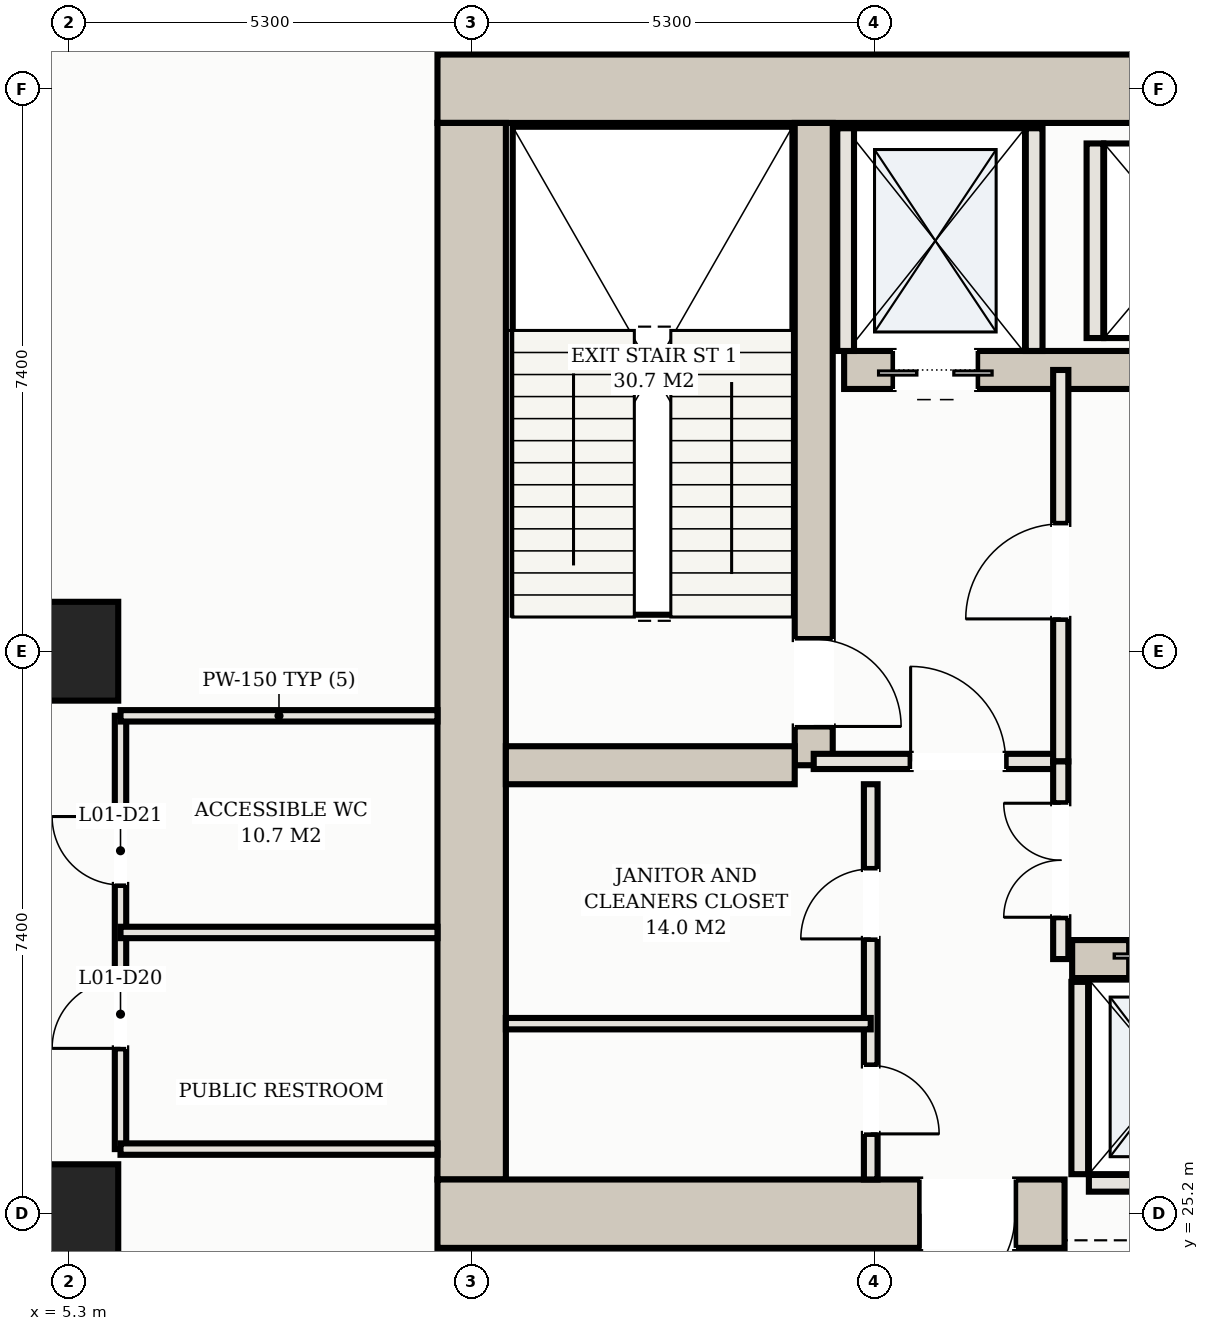
"""IFC4 building model, lengths in metres.
Left out: names, types, materials, properties, quantities, classifications, styles, units other than length and angle.
Written with IfcOpenShell. Run it as: python <this file> out.ifc"""

import sys

from ifc_helpers import new_model, si_unit, direction, frame, frame_2d, origin, origin_2d, place, context, subcontext, project, spatial, rectangle, hollow_rectangle, extrude, element, fill, save


model = new_model("IFC4")
c1 = context("Model", 3, precision=1e-05, world=origin(), true_north=direction((0.0, 1.0)))
c2 = subcontext(c1, "Body", "Model", "MODEL_VIEW")
j1 = project(units=[si_unit("LENGTHUNIT", "METRE"), si_unit("PLANEANGLEUNIT", "RADIAN")], contexts=[c1])
p1 = place(None, origin())
s1 = spatial("IfcSite", under=j1, at=p1, CompositionType="ELEMENT")
p2 = place(p1, origin())
s2 = spatial("IfcBuilding", under=s1, at=p2, CompositionType="ELEMENT")
p3 = place(p2, frame((0.0, 0.0, 5.2)))
s3 = spatial("IfcBuildingStorey", under=s2, at=p3, CompositionType="ELEMENT", Elevation=5.2)
p4 = place(p3, frame((10.15, 40.0, 0.0), z_axis=(0.0, 0.0, 1.0), x_axis=(1.0, 0.0, 0.0)))
e1 = element("IfcWall", 1, at=p4, inside=s3, PredefinedType="SHEAR", context=c2, shape_type="SweptSolid", body=[
    extrude(rectangle(XDim=32.7, YDim=0.9, at=frame_2d((16.35, 0.0))), origin(), (0.0, 0.0, 1.0), 4.35),
])
p5 = place(p3, frame((10.6, 25.65, 0.0), z_axis=(0.0, 0.0, 1.0), x_axis=(0.0, 1.0, 0.0)))
e2 = element("IfcWall", 2, at=p5, inside=s3, PredefinedType="SHEAR", context=c2, shape_type="SweptSolid", body=[
    extrude(rectangle(XDim=13.9, YDim=0.9, at=frame_2d((6.95, 0.0))), origin(), (0.0, 0.0, 1.0), 4.35),
])
p6 = place(p3, frame((10.15, 25.2, 0.0), z_axis=(0.0, 0.0, 1.0), x_axis=(1.0, 0.0, 0.0)))
e3 = element("IfcWall", 3, at=p6, inside=s3, PredefinedType="SHEAR", context=c2, shape_type="SweptSolid", body=[
    extrude(rectangle(XDim=8.25, YDim=0.9, at=frame_2d((4.125, 0.0))), origin(), (0.0, 0.0, 1.0), 4.35),
])
p7 = place(p6, frame((6.35, 0.0, 0.0)))
e4 = element("IfcOpeningElement", 4, at=p7, cuts=e3, PredefinedType="OPENING", context=c2, shape_type="SweptSolid", body=[
    extrude(rectangle(XDim=1.25, YDim=2.2, at=frame_2d((0.625, 1.1))), frame((0.0, 0.46, 0.0), z_axis=(0.0, -1.0, 0.0), x_axis=(1.0, 0.0, 0.0)), (0.0, 0.0, 1.0), 0.92),
])
p8 = place(p3, frame((15.1, 31.1, 0.0), z_axis=(0.0, 0.0, 1.0), x_axis=(0.0, 1.0, 0.0)))
e5 = element("IfcWall", 5, at=p8, inside=s3, PredefinedType="SHEAR", context=c2, shape_type="SweptSolid", body=[
    extrude(rectangle(XDim=8.45, YDim=0.5, at=frame_2d((4.225, 0.0))), origin(), (0.0, 0.0, 1.0), 4.35),
])
p9 = place(p8, frame((0.51, 0.0, 0.0)))
e6 = element("IfcOpeningElement", 6, at=p9, cuts=e5, PredefinedType="OPENING", context=c2, shape_type="SweptSolid", body=[
    extrude(rectangle(XDim=1.15, YDim=2.2, at=frame_2d((0.575, 1.1))), frame((0.0, 0.26, 0.0), z_axis=(0.0, -1.0, 0.0), x_axis=(1.0, 0.0, 0.0)), (0.0, 0.0, 1.0), 0.52),
])
p10 = place(p3, frame((11.05, 31.1, 0.0), z_axis=(0.0, 0.0, 1.0), x_axis=(1.0, 0.0, 0.0)))
e7 = element("IfcWall", 7, at=p10, inside=s3, PredefinedType="SHEAR", context=c2, shape_type="SweptSolid", body=[
    extrude(rectangle(XDim=3.8, YDim=0.5, at=frame_2d((1.9, 0.0))), origin(), (0.0, 0.0, 1.0), 4.35),
])
p11 = place(p3, frame((15.5, 36.3, 0.0), z_axis=(0.0, 0.0, 1.0), x_axis=(1.0, 0.0, 0.0)))
e8 = element("IfcWall", 8, at=p11, inside=s3, PredefinedType="SHEAR", context=c2, shape_type="SweptSolid", body=[
    extrude(rectangle(XDim=22.0, YDim=0.5, at=frame_2d((11.0, 0.0))), origin(), (0.0, 0.0, 1.0), 4.35),
])
p12 = place(p11, frame((0.65, 0.0, 0.0)))
e9 = element("IfcOpeningElement", 9, at=p12, cuts=e8, PredefinedType="OPENING", context=c2, shape_type="SweptSolid", body=[
    extrude(rectangle(XDim=1.1, YDim=2.15, at=frame_2d((0.55, 1.075))), frame((0.0, 0.26, 0.0), z_axis=(0.0, -1.0, 0.0), x_axis=(1.0, 0.0, 0.0)), (0.0, 0.0, 1.0), 0.52),
])
p13 = place(p11, frame((20.25, 0.0, 0.0)))
e10 = element("IfcOpeningElement", 10, at=p13, cuts=e8, PredefinedType="OPENING", context=c2, shape_type="SweptSolid", body=[
    extrude(rectangle(XDim=1.1, YDim=2.15, at=frame_2d((0.55, 1.075))), frame((0.0, 0.26, 0.0), z_axis=(0.0, -1.0, 0.0), x_axis=(1.0, 0.0, 0.0)), (0.0, 0.0, 1.0), 0.52),
])
p14 = place(p11, frame((17.05, 0.0, 0.0)))
e11 = element("IfcOpeningElement", 11, at=p14, cuts=e8, PredefinedType="OPENING", context=c2, shape_type="SweptSolid", body=[
    extrude(rectangle(XDim=1.3, YDim=2.2, at=frame_2d((0.65, 1.1))), frame((0.0, 0.26, 0.0), z_axis=(0.0, -1.0, 0.0), x_axis=(1.0, 0.0, 0.0)), (0.0, 0.0, 1.0), 0.52),
])
p15 = place(p3, frame((18.5, 28.55, 0.0), z_axis=(0.0, 0.0, 1.0), x_axis=(1.0, 0.0, 0.0)))
e12 = element("IfcWall", 12, at=p15, inside=s3, PredefinedType="SHEAR", context=c2, shape_type="SweptSolid", body=[
    extrude(rectangle(XDim=16.0, YDim=0.5, at=frame_2d((8.0, 0.0))), origin(), (0.0, 0.0, 1.0), 4.35),
])
p16 = place(p15, frame((0.75, 0.0, 0.0)))
e13 = element("IfcOpeningElement", 13, at=p16, cuts=e12, PredefinedType="OPENING", context=c2, shape_type="SweptSolid", body=[
    extrude(rectangle(XDim=1.1, YDim=2.15, at=frame_2d((0.55, 1.075))), frame((0.0, 0.26, 0.0), z_axis=(0.0, -1.0, 0.0), x_axis=(1.0, 0.0, 0.0)), (0.0, 0.0, 1.0), 0.52),
])
p17 = place(p15, frame((3.35, 0.0, 0.0)))
e14 = element("IfcOpeningElement", 14, at=p17, cuts=e12, PredefinedType="OPENING", context=c2, shape_type="SweptSolid", body=[
    extrude(rectangle(XDim=1.1, YDim=2.15, at=frame_2d((0.55, 1.075))), frame((0.0, 0.26, 0.0), z_axis=(0.0, -1.0, 0.0), x_axis=(1.0, 0.0, 0.0)), (0.0, 0.0, 1.0), 0.52),
])
p18 = place(p15, frame((5.95, 0.0, 0.0)))
e15 = element("IfcOpeningElement", 15, at=p18, cuts=e12, PredefinedType="OPENING", context=c2, shape_type="SweptSolid", body=[
    extrude(rectangle(XDim=1.1, YDim=2.15, at=frame_2d((0.55, 1.075))), frame((0.0, 0.26, 0.0), z_axis=(0.0, -1.0, 0.0), x_axis=(1.0, 0.0, 0.0)), (0.0, 0.0, 1.0), 0.52),
])
for number, where, z_axis, x_axis in (
    (16, (5.3, 25.2, 0.0), (0.0, 0.0, 1.0), (1.0, 0.0, 0.0)),
    (17, (5.3, 32.6, 0.0), (0.0, 0.0, 1.0), (1.0, 0.0, 0.0)),
):
    element("IfcColumn", number, at=place(p3, frame(where, z_axis=z_axis, x_axis=x_axis)), inside=s3, PredefinedType="COLUMN", context=c2, shape_type="SweptSolid", body=[
        extrude(hollow_rectangle(XDim=1.3, YDim=1.3, WallThickness=0.042, at=origin_2d()), origin(), (0.0, 0.0, 1.0), 4.6),
    ])
for number, where, z_axis, x_axis in (
    (18, (15.52, 36.55, 0.0), (0.0, 0.0, 1.0), (0.0, 1.0, 0.0)),
    (19, (18.0, 36.55, 0.0), (0.0, 0.0, 1.0), (0.0, 1.0, 0.0)),
):
    element("IfcWall", number, at=place(p3, frame(where, z_axis=z_axis, x_axis=x_axis)), inside=s3, PredefinedType="SOLIDWALL", context=c2, shape_type="SweptSolid", body=[
        extrude(rectangle(XDim=2.93, YDim=0.22, at=frame_2d((1.465, 0.0))), origin(), (0.0, 0.0, 1.0), 4.35),
    ])
p19 = place(p3, frame((18.6, 25.72, 0.0), z_axis=(0.0, 0.0, 1.0), x_axis=(0.0, 1.0, 0.0)))
e20 = element("IfcWall", 20, at=p19, inside=s3, PredefinedType="SOLIDWALL", context=c2, shape_type="SweptSolid", body=[
    extrude(rectangle(XDim=2.53, YDim=0.22, at=frame_2d((1.265, 0.0))), origin(), (0.0, 0.0, 1.0), 4.35),
])
p20 = place(p3, frame((18.72, 25.6, 0.0), z_axis=(0.0, 0.0, 1.0), x_axis=(1.0, 0.0, 0.0)))
e21 = element("IfcWall", 21, at=p20, inside=s3, PredefinedType="SOLIDWALL", context=c2, shape_type="SweptSolid", body=[
    extrude(rectangle(XDim=2.16, YDim=0.22, at=frame_2d((1.08, 0.0))), origin(), (0.0, 0.0, 1.0), 4.35),
])
p21 = place(p3, frame((18.8, 36.72, 0.0), z_axis=(0.0, 0.0, 1.0), x_axis=(0.0, 1.0, 0.0)))
e22 = element("IfcWall", 22, at=p21, inside=s3, PredefinedType="SOLIDWALL", context=c2, shape_type="SweptSolid", body=[
    extrude(rectangle(XDim=2.56, YDim=0.22, at=frame_2d((1.28, 0.0))), origin(), (0.0, 0.0, 1.0), 4.35),
])
p22 = place(p3, frame((15.1, 31.15, 0.0), z_axis=(0.0, 0.0, 1.0), x_axis=(1.0, 0.0, 0.0)))
e23 = element("IfcWall", 23, at=p22, inside=s3, PredefinedType="PARTITIONING", context=c2, shape_type="SweptSolid", body=[
    extrude(rectangle(XDim=3.25, YDim=0.2, at=frame_2d((1.625, 0.0))), origin(), (0.0, 0.0, 1.0), 4.35),
])
p23 = place(p22, frame((1.275, 0.0, 0.0)))
e24 = element("IfcOpeningElement", 24, at=p23, cuts=e23, PredefinedType="OPENING", context=c2, shape_type="SweptSolid", body=[
    extrude(rectangle(XDim=1.25, YDim=2.2, at=frame_2d((0.625, 1.1))), frame((0.0, 0.11, 0.0), z_axis=(0.0, -1.0, 0.0), x_axis=(1.0, 0.0, 0.0)), (0.0, 0.0, 1.0), 0.22),
])
p24 = place(p3, frame((18.35, 31.15, 0.0), z_axis=(0.0, 0.0, 1.0), x_axis=(0.0, 1.0, 0.0)))
e25 = element("IfcWall", 25, at=p24, inside=s3, PredefinedType="PARTITIONING", context=c2, shape_type="SweptSolid", body=[
    extrude(rectangle(XDim=5.15, YDim=0.2, at=frame_2d((2.575, 0.0))), origin(), (0.0, 0.0, 1.0), 4.35),
])
p25 = place(p24, frame((1.875, 0.0, 0.0)))
e26 = element("IfcOpeningElement", 26, at=p25, cuts=e25, PredefinedType="OPENING", context=c2, shape_type="SweptSolid", body=[
    extrude(rectangle(XDim=1.25, YDim=2.2, at=frame_2d((0.625, 1.1))), frame((0.0, 0.11, 0.0), z_axis=(0.0, -1.0, 0.0), x_axis=(1.0, 0.0, 0.0)), (0.0, 0.0, 1.0), 0.22),
])
p26 = place(p3, frame((15.85, 25.65, 0.0), z_axis=(0.0, 0.0, 1.0), x_axis=(0.0, 1.0, 0.0)))
e27 = element("IfcWall", 27, at=p26, inside=s3, PredefinedType="PARTITIONING", context=c2, shape_type="SweptSolid", body=[
    extrude(rectangle(XDim=5.2, YDim=0.18, at=frame_2d((2.6, 0.0))), origin(), (0.0, 0.0, 1.0), 4.35),
])
p27 = place(p26, frame((0.6, 0.0, 0.0)))
e28 = element("IfcOpeningElement", 28, at=p27, cuts=e27, PredefinedType="OPENING", context=c2, shape_type="SweptSolid", body=[
    extrude(rectangle(XDim=0.9, YDim=2.15, at=frame_2d((0.45, 1.075))), frame((0.0, 0.1, 0.0), z_axis=(0.0, -1.0, 0.0), x_axis=(1.0, 0.0, 0.0)), (0.0, 0.0, 1.0), 0.2),
])
p28 = place(p26, frame((3.165, 0.0, 0.0)))
e29 = element("IfcOpeningElement", 29, at=p28, cuts=e27, PredefinedType="OPENING", context=c2, shape_type="SweptSolid", body=[
    extrude(rectangle(XDim=0.92, YDim=2.15, at=frame_2d((0.46, 1.075))), frame((0.0, 0.1, 0.0), z_axis=(0.0, -1.0, 0.0), x_axis=(1.0, 0.0, 0.0)), (0.0, 0.0, 1.0), 0.2),
])
p29 = place(p3, frame((11.05, 27.7, 0.0), z_axis=(0.0, 0.0, 1.0), x_axis=(1.0, 0.0, 0.0)))
e30 = element("IfcWall", 30, at=p29, inside=s3, PredefinedType="PARTITIONING", context=c2, shape_type="SweptSolid", body=[
    extrude(rectangle(XDim=4.8, YDim=0.15, at=frame_2d((2.4, 0.0))), origin(), (0.0, 0.0, 1.0), 4.35),
])
p30 = place(p3, frame((18.35, 28.55, 0.0), z_axis=(0.0, 0.0, 1.0), x_axis=(0.0, 1.0, 0.0)))
e31 = element("IfcWall", 31, at=p30, inside=s3, PredefinedType="PARTITIONING", context=c2, shape_type="SweptSolid", body=[
    extrude(rectangle(XDim=2.6, YDim=0.2, at=frame_2d((1.3, 0.0))), origin(), (0.0, 0.0, 1.0), 4.35),
])
p31 = place(p30, frame((0.55, 0.0, 0.0)))
e32 = element("IfcOpeningElement", 32, at=p31, cuts=e31, PredefinedType="OPENING", context=c2, shape_type="SweptSolid", body=[
    extrude(rectangle(XDim=1.5, YDim=2.25, at=frame_2d((0.75, 1.125))), frame((0.0, 0.11, 0.0), z_axis=(0.0, -1.0, 0.0), x_axis=(1.0, 0.0, 0.0)), (0.0, 0.0, 1.0), 0.22),
])
p32 = place(p3, frame((5.98, 26.05, 0.0), z_axis=(0.0, 0.0, 1.0), x_axis=(0.0, 1.0, 0.0)))
e33 = element("IfcWall", 33, at=p32, inside=s3, PredefinedType="PARTITIONING", context=c2, shape_type="SweptSolid", body=[
    extrude(rectangle(XDim=5.7, YDim=0.15, at=frame_2d((2.85, 0.0))), origin(), (0.0, 0.0, 1.0), 4.35),
])
p33 = place(p32, frame((1.325, 0.0, 0.0)))
e34 = element("IfcOpeningElement", 34, at=p33, cuts=e33, PredefinedType="OPENING", context=c2, shape_type="SweptSolid", body=[
    extrude(rectangle(XDim=0.9, YDim=2.15, at=frame_2d((0.45, 1.075))), frame((0.0, 0.085, 0.0), z_axis=(0.0, -1.0, 0.0), x_axis=(1.0, 0.0, 0.0)), (0.0, 0.0, 1.0), 0.17),
])
p34 = place(p32, frame((3.475, 0.0, 0.0)))
e35 = element("IfcOpeningElement", 35, at=p34, cuts=e33, PredefinedType="OPENING", context=c2, shape_type="SweptSolid", body=[
    extrude(rectangle(XDim=0.9, YDim=2.15, at=frame_2d((0.45, 1.075))), frame((0.0, 0.085, 0.0), z_axis=(0.0, -1.0, 0.0), x_axis=(1.0, 0.0, 0.0)), (0.0, 0.0, 1.0), 0.17),
])
for number, where, z_axis, x_axis in (
    (36, (5.98, 26.05, 0.0), (0.0, 0.0, 1.0), (1.0, 0.0, 0.0)),
    (37, (5.98, 28.9, 0.0), (0.0, 0.0, 1.0), (1.0, 0.0, 0.0)),
    (38, (5.98, 31.75, 0.0), (0.0, 0.0, 1.0), (1.0, 0.0, 0.0)),
):
    element("IfcWall", number, at=place(p3, frame(where, z_axis=z_axis, x_axis=x_axis)), inside=s3, PredefinedType="PARTITIONING", context=c2, shape_type="SweptSolid", body=[
        extrude(rectangle(XDim=4.17, YDim=0.15, at=frame_2d((2.085, 0.0))), origin(), (0.0, 0.0, 1.0), 4.35),
    ])
p35 = place(p12, frame((1.1, 0.0, 0.0), z_axis=(0.0, 0.0, 1.0), x_axis=(-1.0, 0.0, 0.0)))
e39 = element("IfcDoor", 39, at=p35, inside=s3, OperationType="DOUBLE_DOOR_SLIDING", PredefinedType="DOOR", context=c2, shape_type="SweptSolid", body=[
    extrude(rectangle(XDim=1.1, YDim=2.15, at=frame_2d((0.55, 1.075))), frame((0.0, 0.025, 0.0), z_axis=(0.0, -1.0, 0.0), x_axis=(1.0, 0.0, 0.0)), (0.0, 0.0, 1.0), 0.05),
])
fill(e9, e39)
p36 = place(p7, frame((1.25, 0.0, 0.0), z_axis=(0.0, 0.0, 1.0), x_axis=(-1.0, 0.0, 0.0)))
e40 = element("IfcDoor", 40, at=p36, inside=s3, OperationType="SINGLE_SWING_RIGHT", PredefinedType="DOOR", context=c2, shape_type="SweptSolid", body=[
    extrude(rectangle(XDim=1.25, YDim=2.2, at=frame_2d((0.625, 1.1))), frame((0.0, 0.025, 0.0), z_axis=(0.0, -1.0, 0.0), x_axis=(1.0, 0.0, 0.0)), (0.0, 0.0, 1.0), 0.05),
])
fill(e4, e40)
p37 = place(p23, origin())
e41 = element("IfcDoor", 41, at=p37, inside=s3, OperationType="SINGLE_SWING_LEFT", PredefinedType="DOOR", context=c2, shape_type="SweptSolid", body=[
    extrude(rectangle(XDim=1.25, YDim=2.2, at=frame_2d((0.625, 1.1))), frame((0.0, 0.025, 0.0), z_axis=(0.0, -1.0, 0.0), x_axis=(1.0, 0.0, 0.0)), (0.0, 0.0, 1.0), 0.05),
])
fill(e24, e41)
p38 = place(p25, origin())
e42 = element("IfcDoor", 42, at=p38, inside=s3, OperationType="SINGLE_SWING_LEFT", PredefinedType="DOOR", context=c2, shape_type="SweptSolid", body=[
    extrude(rectangle(XDim=1.25, YDim=2.2, at=frame_2d((0.625, 1.1))), frame((0.0, 0.025, 0.0), z_axis=(0.0, -1.0, 0.0), x_axis=(1.0, 0.0, 0.0)), (0.0, 0.0, 1.0), 0.05),
])
fill(e26, e42)
p39 = place(p9, frame((1.15, 0.0, 0.0), z_axis=(0.0, 0.0, 1.0), x_axis=(-1.0, 0.0, 0.0)))
e43 = element("IfcDoor", 43, at=p39, inside=s3, OperationType="SINGLE_SWING_RIGHT", PredefinedType="DOOR", context=c2, shape_type="SweptSolid", body=[
    extrude(rectangle(XDim=1.15, YDim=2.2, at=frame_2d((0.575, 1.1))), frame((0.0, 0.025, 0.0), z_axis=(0.0, -1.0, 0.0), x_axis=(1.0, 0.0, 0.0)), (0.0, 0.0, 1.0), 0.05),
])
fill(e6, e43)
p40 = place(p27, frame((0.9, 0.0, 0.0), z_axis=(0.0, 0.0, 1.0), x_axis=(-1.0, 0.0, 0.0)))
e44 = element("IfcDoor", 44, at=p40, inside=s3, OperationType="SINGLE_SWING_RIGHT", PredefinedType="DOOR", context=c2, shape_type="SweptSolid", body=[
    extrude(rectangle(XDim=0.9, YDim=2.15, at=frame_2d((0.45, 1.075))), frame((0.0, 0.025, 0.0), z_axis=(0.0, -1.0, 0.0), x_axis=(1.0, 0.0, 0.0)), (0.0, 0.0, 1.0), 0.05),
])
fill(e28, e44)
p41 = place(p28, origin())
e45 = element("IfcDoor", 45, at=p41, inside=s3, OperationType="SINGLE_SWING_LEFT", PredefinedType="DOOR", context=c2, shape_type="SweptSolid", body=[
    extrude(rectangle(XDim=0.92, YDim=2.15, at=frame_2d((0.46, 1.075))), frame((0.0, 0.025, 0.0), z_axis=(0.0, -1.0, 0.0), x_axis=(1.0, 0.0, 0.0)), (0.0, 0.0, 1.0), 0.05),
])
fill(e29, e45)
p42 = place(p31, origin())
e46 = element("IfcDoor", 46, at=p42, inside=s3, OperationType="DOUBLE_DOOR_SINGLE_SWING", PredefinedType="DOOR", context=c2, shape_type="SweptSolid", body=[
    extrude(rectangle(XDim=1.5, YDim=2.25, at=frame_2d((0.75, 1.125))), frame((0.0, 0.025, 0.0), z_axis=(0.0, -1.0, 0.0), x_axis=(1.0, 0.0, 0.0)), (0.0, 0.0, 1.0), 0.05),
])
fill(e32, e46)
p43 = place(p33, origin())
e47 = element("IfcDoor", 47, at=p43, inside=s3, OperationType="SINGLE_SWING_LEFT", PredefinedType="DOOR", context=c2, shape_type="SweptSolid", body=[
    extrude(rectangle(XDim=0.9, YDim=2.15, at=frame_2d((0.45, 1.075))), frame((0.0, 0.025, 0.0), z_axis=(0.0, -1.0, 0.0), x_axis=(1.0, 0.0, 0.0)), (0.0, 0.0, 1.0), 0.05),
])
fill(e34, e47)
p44 = place(p34, origin())
e48 = element("IfcDoor", 48, at=p44, inside=s3, OperationType="SINGLE_SWING_RIGHT", PredefinedType="DOOR", context=c2, shape_type="SweptSolid", body=[
    extrude(rectangle(XDim=0.9, YDim=2.15, at=frame_2d((0.45, 1.075))), frame((0.0, 0.025, 0.0), z_axis=(0.0, -1.0, 0.0), x_axis=(1.0, 0.0, 0.0)), (0.0, 0.0, 1.0), 0.05),
])
fill(e35, e48)
save(model, sys.argv[1])
